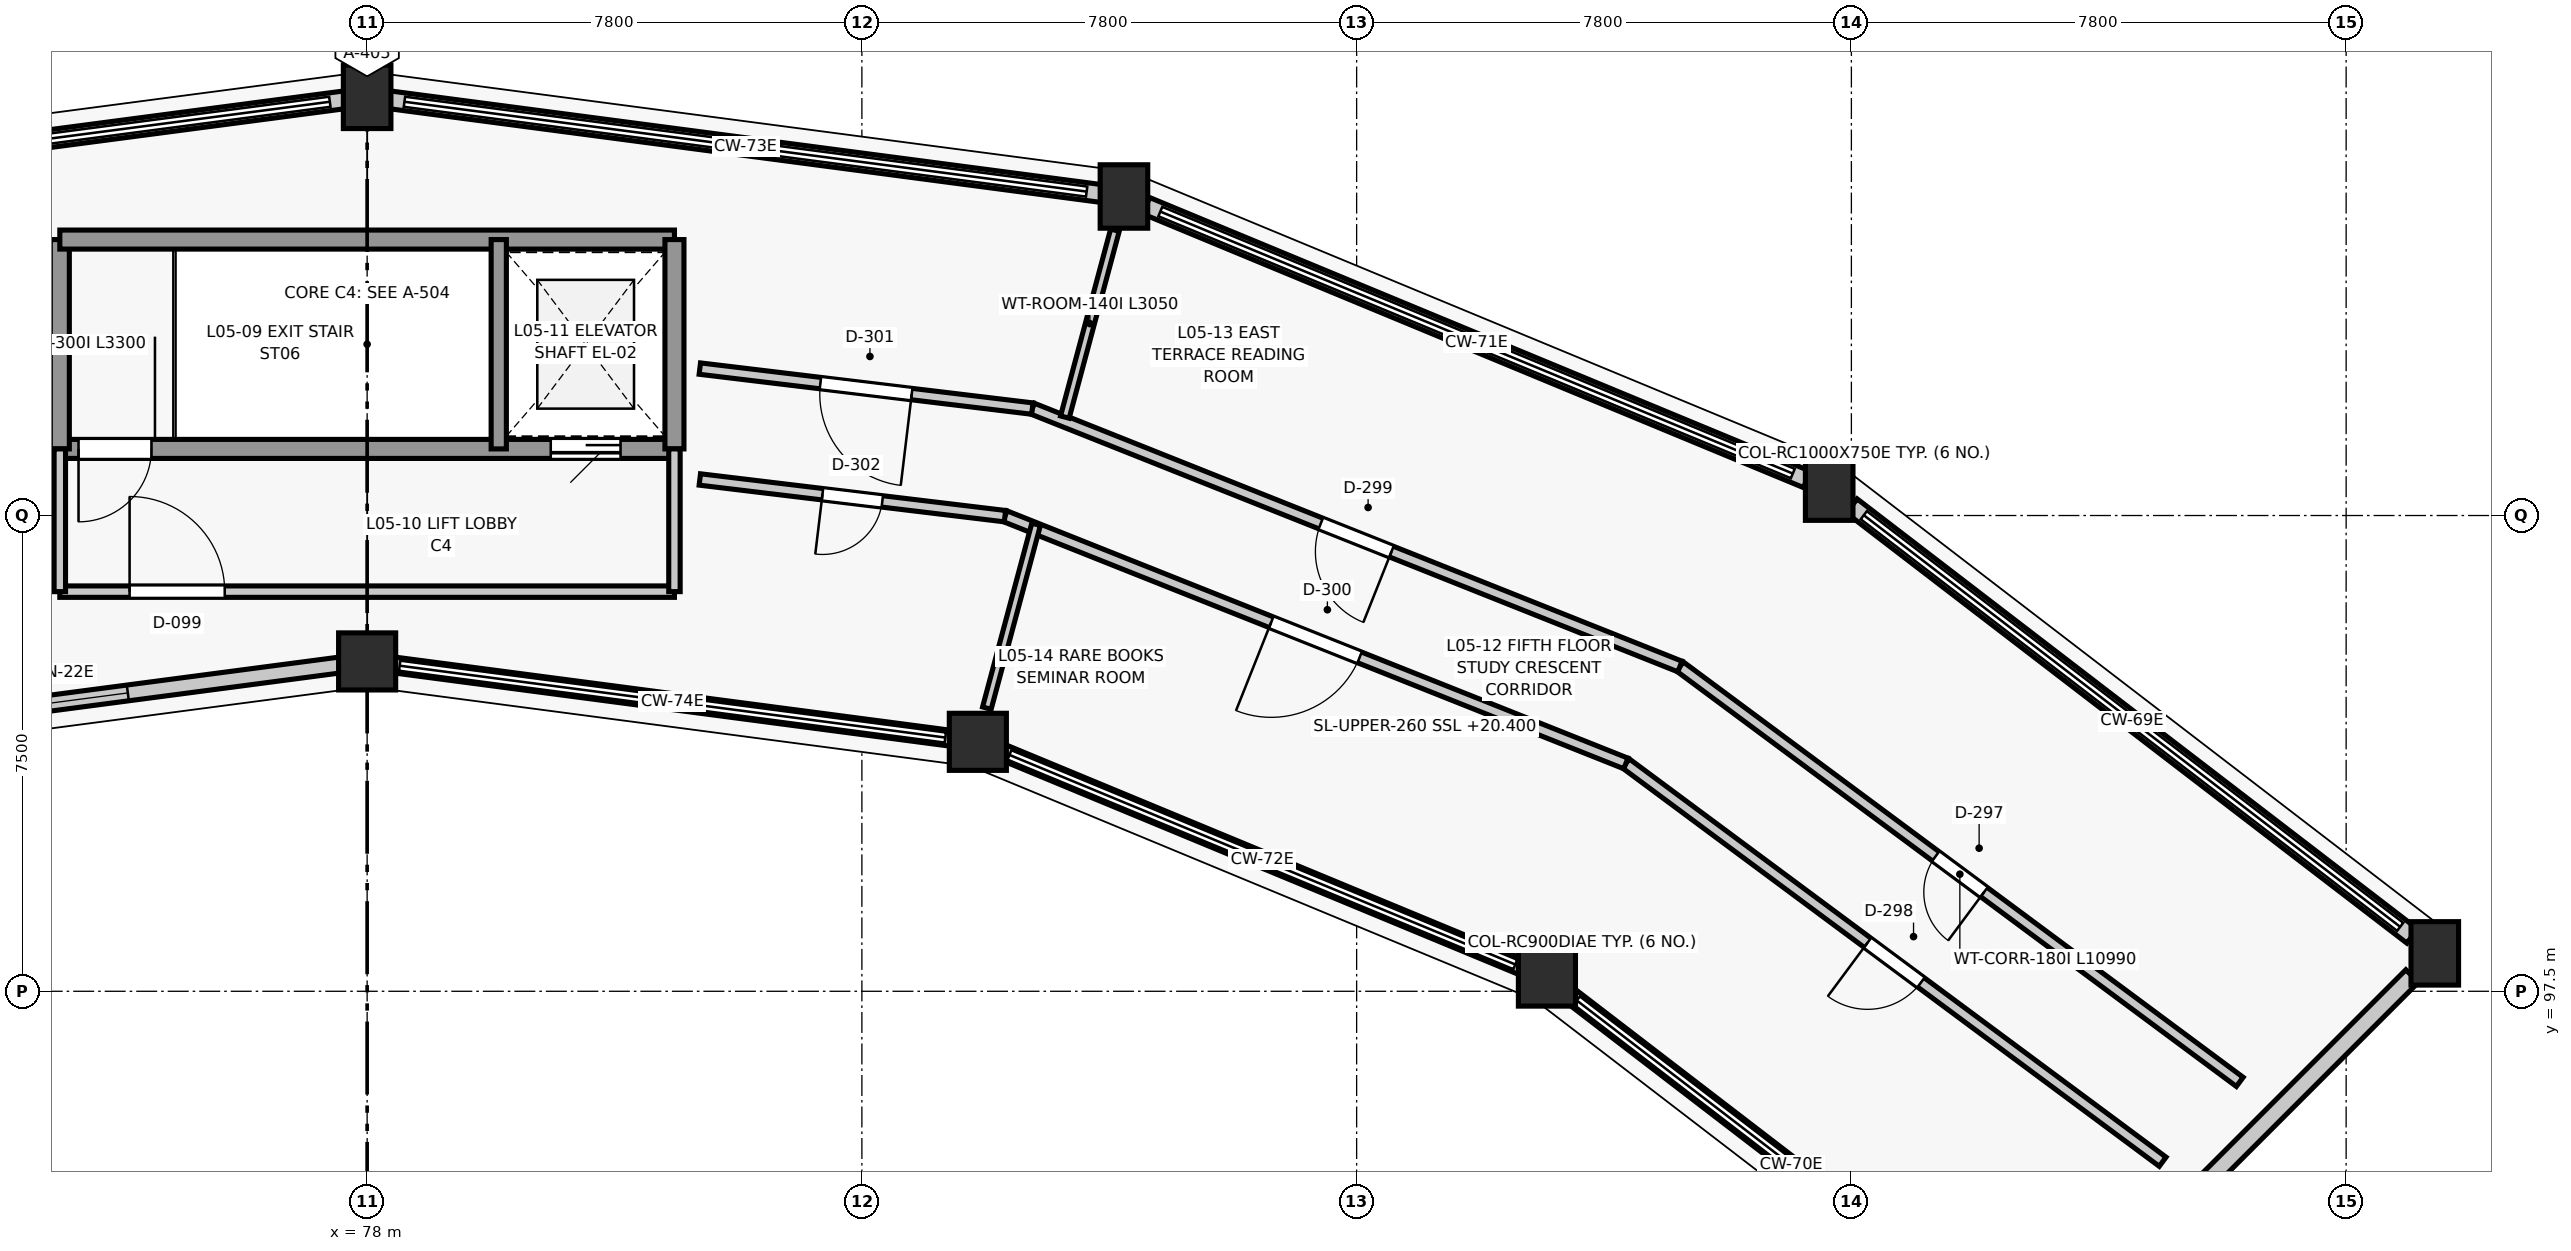
"""IFC4 building model, lengths in metres.
Left out: names, types, materials, properties, quantities, classifications, styles, units other than length and angle.
Written with IfcOpenShell. Run it as: python <this file> out.ifc"""

import sys

from ifc_helpers import new_model, si_unit, direction, frame, frame_2d, origin, origin_2d, place, context, subcontext, project, spatial, rectangle, circle, extrude, element, fill, save


model = new_model("IFC4")
c1 = context("Model", 3, precision=1e-05, world=origin(), true_north=direction((0.0, 1.0)))
c2 = subcontext(c1, "Body", "Model", "MODEL_VIEW")
j1 = project(units=[si_unit("LENGTHUNIT", "METRE"), si_unit("PLANEANGLEUNIT", "RADIAN")], contexts=[c1])
p1 = place(None, origin())
s1 = spatial("IfcSite", under=j1, at=p1, CompositionType="ELEMENT")
p2 = place(p1, origin())
s2 = spatial("IfcBuilding", under=s1, at=p2, CompositionType="ELEMENT")
p3 = place(p2, frame((0.0, 0.0, 20.4)))
s3 = spatial("IfcBuildingStorey", under=s2, at=p3, CompositionType="ELEMENT", Elevation=20.4)
for number, where, z_axis, x_axis in (
    (1, (96.6, 97.716, 0.0), (0.0, 0.0, 1.0), (1.0, 0.0, 0.0)),
    (2, (87.628, 101.432, 0.0), (0.0, 0.0, 1.0), (1.0, 0.0, 0.0)),
    (3, (78.0, 102.7, 0.0), (0.0, 0.0, 1.0), (1.0, 0.0, 0.0)),
):
    element("IfcColumn", number, at=place(p3, frame(where, z_axis=z_axis, x_axis=x_axis)), inside=s3, PredefinedType="COLUMN", context=c2, shape_type="SweptSolid", body=[
        extrude(circle(Radius=0.45, at=origin_2d()), origin(), (0.0, 0.0, 1.0), 3.9),
    ])
for number, where, z_axis, x_axis in (
    (4, (101.05, 105.424, 0.0), (0.0, 0.0, 1.0), (1.0, 0.0, 0.0)),
    (5, (89.932, 110.029, 0.0), (0.0, 0.0, 1.0), (1.0, 0.0, 0.0)),
    (6, (78.0, 111.6, 0.0), (0.0, 0.0, 1.0), (1.0, 0.0, 0.0)),
    (7, (110.598, 98.098, 0.0), (0.0, 0.0, 1.0), (1.0, 0.0, 0.0)),
):
    element("IfcColumn", number, at=place(p3, frame(where, z_axis=z_axis, x_axis=x_axis)), inside=s3, PredefinedType="COLUMN", context=c2, shape_type="SweptSolid", body=[
        extrude(rectangle(XDim=0.75, YDim=1.0, at=origin_2d()), origin(), (0.0, 0.0, 1.0), 3.9),
    ])
p4 = place(p3, frame((101.405, 105.151, 0.0), z_axis=(0.0, 0.0, 1.0), x_axis=(0.793342066679, -0.608776120785, 0.0)))
e8 = element("IfcWall", 8, at=p4, inside=s3, PredefinedType="STANDARD", context=c2, shape_type="SweptSolid", body=[
    extrude(rectangle(XDim=11.139, YDim=0.28, at=frame_2d((5.57, 0.0))), origin(), (0.0, 0.0, 1.0), 0.82),
])
p5 = place(p3, frame((104.024, 92.019, 0.0), z_axis=(0.0, 0.0, 1.0), x_axis=(-0.793347085527, 0.608769580289, 0.0)))
e9 = element("IfcWall", 9, at=p5, inside=s3, PredefinedType="STANDARD", context=c2, shape_type="SweptSolid", body=[
    extrude(rectangle(XDim=9.005, YDim=0.25, at=frame_2d((4.502, 0.0))), origin(), (0.0, 0.0, 1.0), 0.82),
])
p6 = place(p3, frame((90.283, 109.883, 0.0), z_axis=(0.0, 0.0, 1.0), x_axis=(0.923883530636, -0.382673779896, 0.0)))
e10 = element("IfcWall", 10, at=p6, inside=s3, PredefinedType="STANDARD", context=c2, shape_type="SweptSolid", body=[
    extrude(rectangle(XDim=11.272, YDim=0.28, at=frame_2d((5.636, 0.0))), origin(), (0.0, 0.0, 1.0), 0.82),
])
p7 = place(p3, frame((96.323, 97.831, 0.0), z_axis=(0.0, 0.0, 1.0), x_axis=(-0.923880324771, 0.382681519675, 0.0)))
e11 = element("IfcWall", 11, at=p7, inside=s3, PredefinedType="STANDARD", context=c2, shape_type="SweptSolid", body=[
    extrude(rectangle(XDim=9.112, YDim=0.25, at=frame_2d((4.556, 0.0))), origin(), (0.0, 0.0, 1.0), 0.82),
])
p8 = place(p3, frame((78.35, 111.554, 0.0), z_axis=(0.0, 0.0, 1.0), x_axis=(0.991443215359, -0.130538694334, 0.0)))
e12 = element("IfcWall", 12, at=p8, inside=s3, PredefinedType="STANDARD", context=c2, shape_type="SweptSolid", body=[
    extrude(rectangle(XDim=11.328, YDim=0.28, at=frame_2d((5.664, 0.0))), origin(), (0.0, 0.0, 1.0), 0.82),
])
p9 = place(p3, frame((87.353, 101.469, 0.0), z_axis=(0.0, 0.0, 1.0), x_axis=(-0.991441766434, 0.130549698469, 0.0)))
e13 = element("IfcWall", 13, at=p9, inside=s3, PredefinedType="STANDARD", context=c2, shape_type="SweptSolid", body=[
    extrude(rectangle(XDim=9.156, YDim=0.25, at=frame_2d((4.578, 0.0))), origin(), (0.0, 0.0, 1.0), 0.82),
])
p10 = place(p3, frame((66.419, 110.075, 0.0), z_axis=(0.0, 0.0, 1.0), x_axis=(0.991443215359, 0.130538694334, 0.0)))
e14 = element("IfcWall", 14, at=p10, inside=s3, PredefinedType="STANDARD", context=c2, shape_type="SweptSolid", body=[
    extrude(rectangle(XDim=11.328, YDim=0.28, at=frame_2d((5.664, 0.0))), origin(), (0.0, 0.0, 1.0), 0.82),
])
p11 = place(p3, frame((77.725, 102.664, 0.0), z_axis=(0.0, 0.0, 1.0), x_axis=(-0.991441766434, -0.130549698469, 0.0)))
e15 = element("IfcWall", 15, at=p11, inside=s3, PredefinedType="STANDARD", context=c2, shape_type="SweptSolid", body=[
    extrude(rectangle(XDim=9.156, YDim=0.25, at=frame_2d((4.578, 0.0))), origin(), (0.0, 0.0, 1.0), 2.969),
])
p12 = place(p11, frame((3.528, 0.0, 0.85)))
e16 = element("IfcOpeningElement", 16, at=p12, cuts=e15, PredefinedType="OPENING", context=c2, shape_type="SweptSolid", body=[
    extrude(rectangle(XDim=2.1, YDim=1.75, at=frame_2d((1.05, 0.875))), frame((0.0, 0.135, 0.0), z_axis=(0.0, -1.0, 0.0), x_axis=(1.0, 0.0, 0.0)), (0.0, 0.0, 1.0), 0.27),
])
p13 = place(p3, frame((110.24, 97.74, 0.0), z_axis=(0.0, 0.0, 1.0), x_axis=(-0.707106781187, -0.707106781187, 0.0)))
e17 = element("IfcWall", 17, at=p13, inside=s3, PredefinedType="STANDARD", context=c2, shape_type="SweptSolid", body=[
    extrude(rectangle(XDim=7.995, YDim=0.28, at=frame_2d((3.998, 0.0))), origin(), (0.0, 0.0, 1.0), 3.037),
])
p14 = place(p3, frame((82.845, 106.05, 0.0), z_axis=(0.0, 0.0, 1.0), x_axis=(-1.0, 0.0, 0.0)))
e18 = element("IfcWall", 18, at=p14, inside=s3, PredefinedType="SHEAR", context=c2, shape_type="SweptSolid", body=[
    extrude(rectangle(XDim=9.69, YDim=0.3, at=frame_2d((4.845, 0.0))), origin(), (0.0, 0.0, 1.0), 3.9),
])
p15 = place(p14, frame((8.245, 0.0, 0.0)))
e19 = element("IfcOpeningElement", 19, at=p15, cuts=e18, PredefinedType="OPENING", context=c2, shape_type="SweptSolid", body=[
    extrude(rectangle(XDim=1.15, YDim=2.15, at=frame_2d((0.575, 1.075))), frame((0.0, 0.16, 0.0), z_axis=(0.0, -1.0, 0.0), x_axis=(1.0, 0.0, 0.0)), (0.0, 0.0, 1.0), 0.32),
])
p16 = place(p14, frame((0.85, 0.0, 0.0)))
e20 = element("IfcOpeningElement", 20, at=p16, cuts=e18, PredefinedType="OPENING", context=c2, shape_type="SweptSolid", body=[
    extrude(rectangle(XDim=1.1, YDim=2.15, at=frame_2d((0.55, 1.075))), frame((0.0, 0.16, 0.0), z_axis=(0.0, -1.0, 0.0), x_axis=(1.0, 0.0, 0.0)), (0.0, 0.0, 1.0), 0.32),
])
p17 = place(p3, frame((73.155, 106.05, 0.0), z_axis=(0.0, 0.0, 1.0), x_axis=(0.0, 1.0, 0.0)))
e21 = element("IfcWall", 21, at=p17, inside=s3, PredefinedType="SHEAR", context=c2, shape_type="SweptSolid", body=[
    extrude(rectangle(XDim=3.3, YDim=0.3, at=frame_2d((1.65, 0.0))), origin(), (0.0, 0.0, 1.0), 3.9),
])
p18 = place(p3, frame((73.155, 109.35, 0.0), z_axis=(0.0, 0.0, 1.0), x_axis=(1.0, 0.0, 0.0)))
e22 = element("IfcWall", 22, at=p18, inside=s3, PredefinedType="SHEAR", context=c2, shape_type="SweptSolid", body=[
    extrude(rectangle(XDim=9.69, YDim=0.3, at=frame_2d((4.845, 0.0))), origin(), (0.0, 0.0, 1.0), 3.9),
])
p19 = place(p3, frame((82.845, 109.35, 0.0), z_axis=(0.0, 0.0, 1.0), x_axis=(0.0, -1.0, 0.0)))
e23 = element("IfcWall", 23, at=p19, inside=s3, PredefinedType="SHEAR", context=c2, shape_type="SweptSolid", body=[
    extrude(rectangle(XDim=3.3, YDim=0.3, at=frame_2d((1.65, 0.0))), origin(), (0.0, 0.0, 1.0), 3.9),
])
p20 = place(p3, frame((80.075, 106.05, 0.0), z_axis=(0.0, 0.0, 1.0), x_axis=(0.0, 1.0, 0.0)))
e24 = element("IfcWall", 24, at=p20, inside=s3, PredefinedType="SHEAR", context=c2, shape_type="SweptSolid", body=[
    extrude(rectangle(XDim=3.3, YDim=0.24, at=frame_2d((1.65, 0.0))), origin(), (0.0, 0.0, 1.0), 3.9),
])
p21 = place(p3, frame((73.155, 103.8, 0.0), z_axis=(0.0, 0.0, 1.0), x_axis=(1.0, 0.0, 0.0)))
e25 = element("IfcWall", 25, at=p21, inside=s3, PredefinedType="PARTITIONING", context=c2, shape_type="SweptSolid", body=[
    extrude(rectangle(XDim=9.69, YDim=0.18, at=frame_2d((4.845, 0.0))), origin(), (0.0, 0.0, 1.0), 3.675),
])
p22 = place(p21, frame((1.1, 0.0, 0.0)))
e26 = element("IfcOpeningElement", 26, at=p22, cuts=e25, PredefinedType="OPENING", context=c2, shape_type="SweptSolid", body=[
    extrude(rectangle(XDim=1.5, YDim=2.15, at=frame_2d((0.75, 1.075))), frame((0.0, 0.1, 0.0), z_axis=(0.0, -1.0, 0.0), x_axis=(1.0, 0.0, 0.0)), (0.0, 0.0, 1.0), 0.2),
])
for number, where, z_axis, x_axis in (
    (27, (73.155, 106.05, 0.0), (0.0, 0.0, 1.0), (0.0, -1.0, 0.0)),
    (28, (82.845, 106.05, 0.0), (0.0, 0.0, 1.0), (0.0, -1.0, 0.0)),
):
    element("IfcWall", number, at=place(p3, frame(where, z_axis=z_axis, x_axis=x_axis)), inside=s3, PredefinedType="PARTITIONING", context=c2, shape_type="SweptSolid", body=[
        extrude(rectangle(XDim=2.25, YDim=0.18, at=frame_2d((1.125, 0.0))), origin(), (0.0, 0.0, 1.0), 3.675),
    ])
p23 = place(p3, frame((107.523, 96.072, 0.0), z_axis=(0.0, 0.0, 1.0), x_axis=(-0.803116202906, 0.595822427096, 0.0)))
e29 = element("IfcWall", 29, at=p23, inside=s3, PredefinedType="PARTITIONING", context=c2, shape_type="SweptSolid", body=[
    extrude(rectangle(XDim=10.99, YDim=0.18, at=frame_2d((5.495, 0.0))), origin(), (0.0, 0.0, 1.0), 3.675),
])
p24 = place(p23, frame((5.02, 0.0, 0.0)))
e30 = element("IfcOpeningElement", 30, at=p24, cuts=e29, PredefinedType="OPENING", context=c2, shape_type="SweptSolid", body=[
    extrude(rectangle(XDim=0.95, YDim=2.1, at=frame_2d((0.475, 1.05))), frame((0.0, 0.1, 0.0), z_axis=(0.0, -1.0, 0.0), x_axis=(1.0, 0.0, 0.0)), (0.0, 0.0, 1.0), 0.2),
])
p25 = place(p3, frame((106.307, 94.813, 0.0), z_axis=(0.0, 0.0, 1.0), x_axis=(-0.803116983103, 0.595821375457, 0.0)))
e31 = element("IfcWall", 31, at=p25, inside=s3, PredefinedType="PARTITIONING", context=c2, shape_type="SweptSolid", body=[
    extrude(rectangle(XDim=10.537, YDim=0.18, at=frame_2d((5.269, 0.0))), origin(), (0.0, 0.0, 1.0), 3.675),
])
p26 = place(p25, frame((4.744, 0.0, 0.0)))
e32 = element("IfcOpeningElement", 32, at=p26, cuts=e31, PredefinedType="OPENING", context=c2, shape_type="SweptSolid", body=[
    extrude(rectangle(XDim=1.05, YDim=2.1, at=frame_2d((0.525, 1.05))), frame((0.0, 0.1, 0.0), z_axis=(0.0, -1.0, 0.0), x_axis=(1.0, 0.0, 0.0)), (0.0, 0.0, 1.0), 0.2),
])
p27 = place(p3, frame((98.697, 102.62, 0.0), z_axis=(0.0, 0.0, 1.0), x_axis=(-0.929039440746, 0.369980698873, 0.0)))
e33 = element("IfcWall", 33, at=p27, inside=s3, PredefinedType="PARTITIONING", context=c2, shape_type="SweptSolid", body=[
    extrude(rectangle(XDim=10.99, YDim=0.18, at=frame_2d((5.495, 0.0))), origin(), (0.0, 0.0, 1.0), 3.675),
])
p28 = place(p27, frame((4.895, 0.0, 0.0)))
e34 = element("IfcOpeningElement", 34, at=p28, cuts=e33, PredefinedType="OPENING", context=c2, shape_type="SweptSolid", body=[
    extrude(rectangle(XDim=1.2, YDim=2.15, at=frame_2d((0.6, 1.075))), frame((0.0, 0.1, 0.0), z_axis=(0.0, -1.0, 0.0), x_axis=(1.0, 0.0, 0.0)), (0.0, 0.0, 1.0), 0.2),
])
p29 = place(p3, frame((97.845, 101.091, 0.0), z_axis=(0.0, 0.0, 1.0), x_axis=(-0.929033313581, 0.36999608411, 0.0)))
e35 = element("IfcWall", 35, at=p29, inside=s3, PredefinedType="PARTITIONING", context=c2, shape_type="SweptSolid", body=[
    extrude(rectangle(XDim=10.537, YDim=0.18, at=frame_2d((5.269, 0.0))), origin(), (0.0, 0.0, 1.0), 3.675),
])
p30 = place(p29, frame((4.519, 0.0, 0.0)))
e36 = element("IfcOpeningElement", 36, at=p30, cuts=e35, PredefinedType="OPENING", context=c2, shape_type="SweptSolid", body=[
    extrude(rectangle(XDim=1.5, YDim=2.15, at=frame_2d((0.75, 1.075))), frame((0.0, 0.1, 0.0), z_axis=(0.0, -1.0, 0.0), x_axis=(1.0, 0.0, 0.0)), (0.0, 0.0, 1.0), 0.2),
])
p31 = place(p3, frame((88.487, 106.686, 0.0), z_axis=(0.0, 0.0, 1.0), x_axis=(-0.992847489582, 0.119389540709, 0.0)))
e37 = element("IfcWall", 37, at=p31, inside=s3, PredefinedType="PARTITIONING", context=c2, shape_type="SweptSolid", body=[
    extrude(rectangle(XDim=5.28, YDim=0.18, at=frame_2d((2.64, 0.0))), origin(), (0.0, 0.0, 1.0), 3.675),
])
p32 = place(p31, frame((1.915, 0.0, 0.0)))
e38 = element("IfcOpeningElement", 38, at=p32, cuts=e37, PredefinedType="OPENING", context=c2, shape_type="SweptSolid", body=[
    extrude(rectangle(XDim=1.45, YDim=2.2, at=frame_2d((0.725, 1.1))), frame((0.0, 0.1, 0.0), z_axis=(0.0, -1.0, 0.0), x_axis=(1.0, 0.0, 0.0)), (0.0, 0.0, 1.0), 0.2),
])
p33 = place(p3, frame((88.055, 104.99, 0.0), z_axis=(0.0, 0.0, 1.0), x_axis=(-0.992849152451, 0.119375711422, 0.0)))
e39 = element("IfcWall", 39, at=p33, inside=s3, PredefinedType="PARTITIONING", context=c2, shape_type="SweptSolid", body=[
    extrude(rectangle(XDim=4.845, YDim=0.18, at=frame_2d((2.422, 0.0))), origin(), (0.0, 0.0, 1.0), 3.675),
])
p34 = place(p33, frame((1.948, 0.0, 0.0)))
e40 = element("IfcOpeningElement", 40, at=p34, cuts=e39, PredefinedType="OPENING", context=c2, shape_type="SweptSolid", body=[
    extrude(rectangle(XDim=0.95, YDim=2.1, at=frame_2d((0.475, 1.05))), frame((0.0, 0.1, 0.0), z_axis=(0.0, -1.0, 0.0), x_axis=(1.0, 0.0, 0.0)), (0.0, 0.0, 1.0), 0.2),
])
p35 = place(p3, frame((89.0, 106.552, 0.0), z_axis=(0.0, 0.0, 1.0), x_axis=(0.258868119081, 0.96591267562, 0.0)))
e41 = element("IfcWall", 41, at=p35, inside=s3, PredefinedType="PARTITIONING", context=c2, shape_type="SweptSolid", body=[
    extrude(rectangle(XDim=3.05, YDim=0.14, at=frame_2d((1.525, 0.0))), origin(), (0.0, 0.0, 1.0), 3.037),
])
p36 = place(p3, frame((87.771, 101.964, 0.0), z_axis=(0.0, 0.0, 1.0), x_axis=(0.258776761059, 0.965937155273, 0.0)))
e42 = element("IfcWall", 42, at=p36, inside=s3, PredefinedType="PARTITIONING", context=c2, shape_type="SweptSolid", body=[
    extrude(rectangle(XDim=3.0, YDim=0.14, at=frame_2d((1.5, 0.0))), origin(), (0.0, 0.0, 1.0), 3.037),
])
p37 = place(p12, origin())
e43 = element("IfcWindow", 43, at=p37, inside=s3, PartitioningType="SINGLE_PANEL", PredefinedType="WINDOW", context=c2, shape_type="SweptSolid", body=[
    extrude(rectangle(XDim=2.1, YDim=1.75, at=frame_2d((1.05, 0.875))), frame((0.0, 0.03, 0.0), z_axis=(0.0, -1.0, 0.0), x_axis=(1.0, 0.0, 0.0)), (0.0, 0.0, 1.0), 0.06),
])
fill(e16, e43)
p38 = place(p15, origin())
e44 = element("IfcDoor", 44, at=p38, inside=s3, OperationType="SINGLE_SWING_RIGHT", PredefinedType="DOOR", context=c2, shape_type="SweptSolid", body=[
    extrude(rectangle(XDim=1.15, YDim=2.15, at=frame_2d((0.575, 1.075))), frame((0.0, 0.025, 0.0), z_axis=(0.0, -1.0, 0.0), x_axis=(1.0, 0.0, 0.0)), (0.0, 0.0, 1.0), 0.05),
])
fill(e19, e44)
p39 = place(p16, origin())
e45 = element("IfcDoor", 45, at=p39, inside=s3, OperationType="SLIDING_TO_LEFT", PredefinedType="DOOR", context=c2, shape_type="SweptSolid", body=[
    extrude(rectangle(XDim=1.1, YDim=2.15, at=frame_2d((0.55, 1.075))), frame((0.0, 0.025, 0.0), z_axis=(0.0, -1.0, 0.0), x_axis=(1.0, 0.0, 0.0)), (0.0, 0.0, 1.0), 0.05),
])
fill(e20, e45)
p40 = place(p22, origin())
e46 = element("IfcDoor", 46, at=p40, inside=s3, OperationType="SINGLE_SWING_LEFT", PredefinedType="DOOR", context=c2, shape_type="SweptSolid", body=[
    extrude(rectangle(XDim=1.5, YDim=2.15, at=frame_2d((0.75, 1.075))), frame((0.0, 0.025, 0.0), z_axis=(0.0, -1.0, 0.0), x_axis=(1.0, 0.0, 0.0)), (0.0, 0.0, 1.0), 0.05),
])
fill(e26, e46)
p41 = place(p24, origin())
e47 = element("IfcDoor", 47, at=p41, inside=s3, OperationType="SINGLE_SWING_LEFT", PredefinedType="DOOR", context=c2, shape_type="SweptSolid", body=[
    extrude(rectangle(XDim=0.95, YDim=2.1, at=frame_2d((0.475, 1.05))), frame((0.0, 0.025, 0.0), z_axis=(0.0, -1.0, 0.0), x_axis=(1.0, 0.0, 0.0)), (0.0, 0.0, 1.0), 0.05),
])
fill(e30, e47)
p42 = place(p26, origin())
e48 = element("IfcDoor", 48, at=p42, inside=s3, OperationType="SINGLE_SWING_RIGHT", PredefinedType="DOOR", context=c2, shape_type="SweptSolid", body=[
    extrude(rectangle(XDim=1.05, YDim=2.1, at=frame_2d((0.525, 1.05))), frame((0.0, 0.025, 0.0), z_axis=(0.0, -1.0, 0.0), x_axis=(1.0, 0.0, 0.0)), (0.0, 0.0, 1.0), 0.05),
])
fill(e32, e48)
p43 = place(p28, origin())
e49 = element("IfcDoor", 49, at=p43, inside=s3, OperationType="SINGLE_SWING_LEFT", PredefinedType="DOOR", context=c2, shape_type="SweptSolid", body=[
    extrude(rectangle(XDim=1.2, YDim=2.15, at=frame_2d((0.6, 1.075))), frame((0.0, 0.025, 0.0), z_axis=(0.0, -1.0, 0.0), x_axis=(1.0, 0.0, 0.0)), (0.0, 0.0, 1.0), 0.05),
])
fill(e34, e49)
p44 = place(p30, origin())
e50 = element("IfcDoor", 50, at=p44, inside=s3, OperationType="SINGLE_SWING_RIGHT", PredefinedType="DOOR", context=c2, shape_type="SweptSolid", body=[
    extrude(rectangle(XDim=1.5, YDim=2.15, at=frame_2d((0.75, 1.075))), frame((0.0, 0.025, 0.0), z_axis=(0.0, -1.0, 0.0), x_axis=(1.0, 0.0, 0.0)), (0.0, 0.0, 1.0), 0.05),
])
fill(e36, e50)
p45 = place(p32, origin())
e51 = element("IfcDoor", 51, at=p45, inside=s3, OperationType="SINGLE_SWING_LEFT", PredefinedType="DOOR", context=c2, shape_type="SweptSolid", body=[
    extrude(rectangle(XDim=1.45, YDim=2.2, at=frame_2d((0.725, 1.1))), frame((0.0, 0.025, 0.0), z_axis=(0.0, -1.0, 0.0), x_axis=(1.0, 0.0, 0.0)), (0.0, 0.0, 1.0), 0.05),
])
fill(e38, e51)
p46 = place(p34, origin())
e52 = element("IfcDoor", 52, at=p46, inside=s3, OperationType="SINGLE_SWING_RIGHT", PredefinedType="DOOR", context=c2, shape_type="SweptSolid", body=[
    extrude(rectangle(XDim=0.95, YDim=2.1, at=frame_2d((0.475, 1.05))), frame((0.0, 0.025, 0.0), z_axis=(0.0, -1.0, 0.0), x_axis=(1.0, 0.0, 0.0)), (0.0, 0.0, 1.0), 0.05),
])
fill(e40, e52)
save(model, sys.argv[1])
